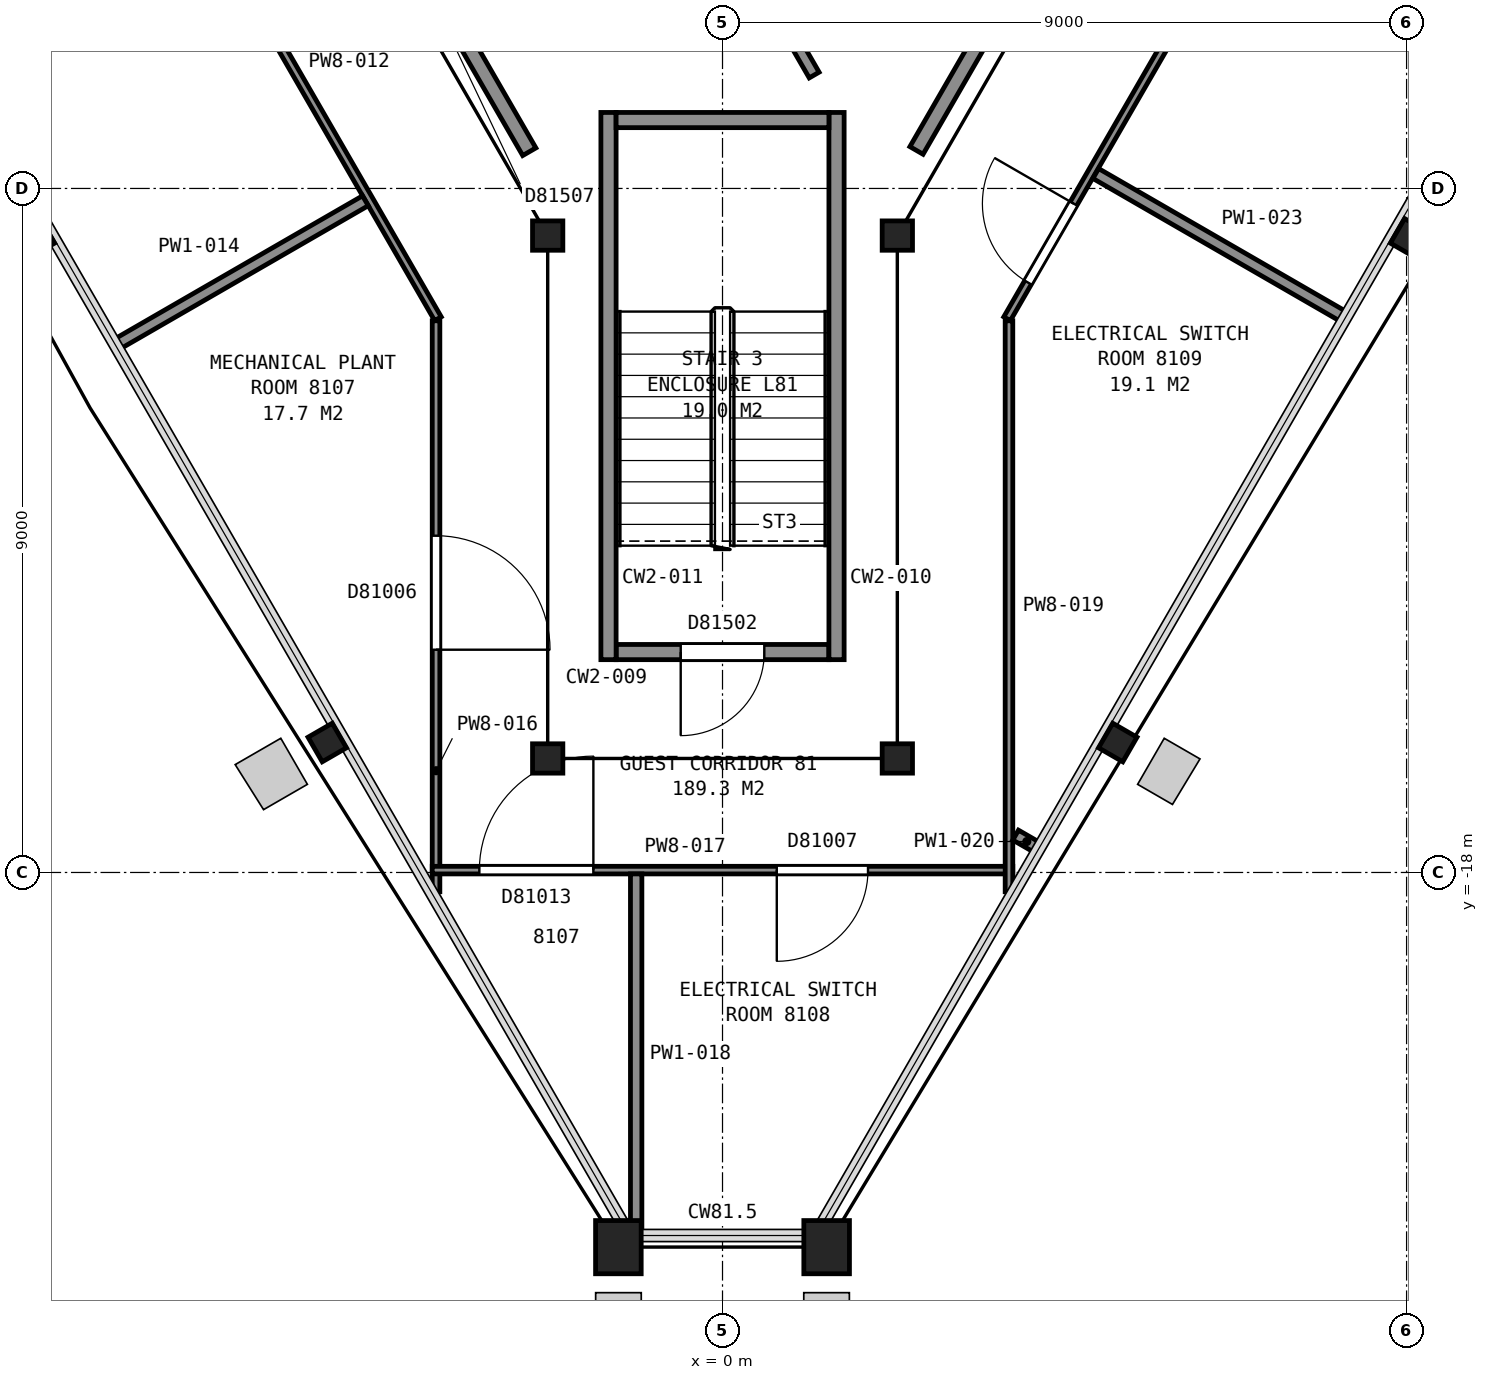
"""IFC4 building model, lengths in metres.
Left out: names, types, materials, properties, quantities, classifications, styles, units other than length and angle.
Written with IfcOpenShell. Run it as: python <this file> out.ifc"""

import sys

from ifc_helpers import new_model, si_unit, direction, frame, frame_2d, origin, origin_2d, place, context, subcontext, project, spatial, rectangle, hollow_rectangle, i_section, extrude, element, fill, save


model = new_model("IFC4")
c1 = context("Model", 3, precision=1e-05, world=origin(), true_north=direction((0.0, 1.0)))
c2 = subcontext(c1, "Body", "Model", "MODEL_VIEW")
j1 = project(units=[si_unit("LENGTHUNIT", "METRE"), si_unit("PLANEANGLEUNIT", "RADIAN")], contexts=[c1])
p1 = place(None, origin())
s1 = spatial("IfcSite", under=j1, at=p1, CompositionType="ELEMENT")
p2 = place(p1, origin())
s2 = spatial("IfcBuilding", under=s1, at=p2, CompositionType="ELEMENT")
p3 = place(p2, frame((0.0, 0.0, 321.0)))
s3 = spatial("IfcBuildingStorey", under=s2, at=p3, CompositionType="ELEMENT", Elevation=321.0)
for number, where, z_axis, x_axis in (
    (1, (-9.04, -9.65, 0.0), (0.0, 0.0, 1.0), (-0.5, 0.866, 0.0)),
    (2, (-5.2, -16.29, 0.0), (0.0, 0.0, 1.0), (-0.5, 0.866, 0.0)),
):
    element("IfcColumn", number, at=place(p3, frame(where, z_axis=z_axis, x_axis=x_axis)), inside=s3, PredefinedType="COLUMN", context=c2, shape_type="SweptSolid", body=[
        extrude(i_section(OverallWidth=0.373, OverallDepth=0.368, WebThickness=0.015, FlangeThickness=0.024, FilletRadius=0.015, at=origin_2d()), origin(), (0.0, 0.0, 1.0), 4.2),
    ])
for number, where, z_axis, x_axis in (
    (3, (-1.37, -22.93, 0.0), (0.0, 0.0, 1.0), (-1.0, 0.0, 0.0)),
    (4, (1.37, -22.93, 0.0), (0.0, 0.0, 1.0), (-1.0, 0.0, 0.0)),
):
    element("IfcColumn", number, at=place(p3, frame(where, z_axis=z_axis, x_axis=x_axis)), inside=s3, PredefinedType="COLUMN", context=c2, shape_type="SweptSolid", body=[
        extrude(hollow_rectangle(XDim=0.6, YDim=0.7, WallThickness=0.04, at=origin_2d()), origin(), (0.0, 0.0, 1.0), 4.2),
    ])
for number, where, z_axis, x_axis in (
    (5, (5.2, -16.29, 0.0), (0.0, 0.0, 1.0), (-0.5, -0.866, 0.0)),
    (6, (9.04, -9.65, 0.0), (0.0, 0.0, 1.0), (-0.5, -0.866, 0.0)),
):
    element("IfcColumn", number, at=place(p3, frame(where, z_axis=z_axis, x_axis=x_axis)), inside=s3, PredefinedType="COLUMN", context=c2, shape_type="SweptSolid", body=[
        extrude(i_section(OverallWidth=0.373, OverallDepth=0.368, WebThickness=0.015, FlangeThickness=0.024, FilletRadius=0.015, at=origin_2d()), origin(), (0.0, 0.0, 1.0), 4.2),
    ])
for number, where, z_axis, x_axis in (
    (7, (-2.3, -9.62, 0.0), (0.0, 0.0, 1.0), (1.0, 0.0, 0.0)),
    (8, (-2.3, -16.5, 0.0), (0.0, 0.0, 1.0), (-1.0, 0.0, 0.0)),
    (9, (2.3, -16.5, 0.0), (0.0, 0.0, 1.0), (-1.0, 0.0, 0.0)),
    (10, (2.3, -9.62, 0.0), (0.0, 0.0, 1.0), (1.0, 0.0, 0.0)),
):
    element("IfcColumn", number, at=place(p3, frame(where, z_axis=z_axis, x_axis=x_axis)), inside=s3, PredefinedType="COLUMN", context=c2, shape_type="SweptSolid", body=[
        extrude(i_section(OverallWidth=0.399, OverallDepth=0.386, WebThickness=0.021, FlangeThickness=0.033, FilletRadius=0.015, at=origin_2d()), origin(), (0.0, 0.0, 1.0), 4.2),
    ])
p4 = place(p3, frame((-1.4, -15.1, 0.0), z_axis=(0.0, 0.0, 1.0), x_axis=(1.0, 0.0, 0.0)))
e11 = element("IfcWall", 11, at=p4, inside=s3, PredefinedType="PARTITIONING", context=c2, shape_type="SweptSolid", body=[
    extrude(rectangle(XDim=2.8, YDim=0.2, at=frame_2d((1.4, 0.0))), origin(), (0.0, 0.0, 1.0), 3.95),
])
p5 = place(p4, frame((0.85, 0.0, 0.0)))
e12 = element("IfcOpeningElement", 12, at=p5, cuts=e11, PredefinedType="OPENING", context=c2, shape_type="SweptSolid", body=[
    extrude(rectangle(XDim=1.1, YDim=2.1, at=frame_2d((0.55, 1.05))), frame((0.0, 0.11, 0.0), z_axis=(0.0, -1.0, 0.0), x_axis=(1.0, 0.0, 0.0)), (0.0, 0.0, 1.0), 0.22),
])
for number, where, z_axis, x_axis in (
    (13, (1.5, -8.0, 0.0), (0.0, 0.0, 1.0), (0.0, -1.0, 0.0)),
    (14, (-1.5, -8.0, 0.0), (0.0, 0.0, 1.0), (0.0, -1.0, 0.0)),
):
    element("IfcWall", number, at=place(p3, frame(where, z_axis=z_axis, x_axis=x_axis)), inside=s3, PredefinedType="PARTITIONING", context=c2, shape_type="SweptSolid", body=[
        extrude(rectangle(XDim=7.2, YDim=0.2, at=frame_2d((3.6, 0.0))), origin(), (0.0, 0.0, 1.0), 3.95),
    ])
p6 = place(p3, frame((-1.4, -8.1, 0.0), z_axis=(0.0, 0.0, 1.0), x_axis=(1.0, 0.0, 0.0)))
e15 = element("IfcWall", 15, at=p6, inside=s3, PredefinedType="PARTITIONING", context=c2, shape_type="SweptSolid", body=[
    extrude(rectangle(XDim=2.8, YDim=0.2, at=frame_2d((1.4, 0.0))), origin(), (0.0, 0.0, 1.0), 3.95),
])
p7 = place(p3, frame((-7.141, -0.551, 0.0), z_axis=(0.0, 0.0, 1.0), x_axis=(0.499992795234, -0.866029563418, 0.0)))
e16 = element("IfcWall", 16, at=p7, inside=s3, PredefinedType="PARTITIONING", context=c2, shape_type="SweptSolid", body=[
    extrude(rectangle(XDim=9.198, YDim=0.2, at=frame_2d((4.599, 0.0))), origin(), (0.0, 0.0, 1.0), 3.95),
])
p8 = place(p7, frame((4.634, 0.0, 0.0)))
e17 = element("IfcOpeningElement", 17, at=p8, cuts=e16, PredefinedType="OPENING", context=c2, shape_type="SweptSolid", body=[
    extrude(rectangle(XDim=1.8, YDim=2.1, at=frame_2d((0.9, 1.05))), frame((0.0, 0.11, 0.0), z_axis=(0.0, -1.0, 0.0), x_axis=(1.0, 0.0, 0.0)), (0.0, 0.0, 1.0), 0.22),
])
p9 = place(p3, frame((-1.007, -3.676, 0.0), z_axis=(0.0, 0.0, 1.0), x_axis=(0.500037662692, -0.866003658127, 0.0)))
e18 = element("IfcWall", 18, at=p9, inside=s3, PredefinedType="PARTITIONING", context=c2, shape_type="SweptSolid", body=[
    extrude(rectangle(XDim=4.425, YDim=0.15, at=frame_2d((2.212, 0.0))), origin(), (0.0, 0.0, 1.0), 3.95),
])
p10 = place(p3, frame((2.552, -8.5, 0.0), z_axis=(0.0, 0.0, 1.0), x_axis=(0.499967462014, 0.866044188784, 0.0)))
e19 = element("IfcWall", 19, at=p10, inside=s3, PredefinedType="PARTITIONING", context=c2, shape_type="SweptSolid", body=[
    extrude(rectangle(XDim=13.025, YDim=0.2, at=frame_2d((6.512, 0.0))), origin(), (0.0, 0.0, 1.0), 3.95),
])
p11 = place(p3, frame((-3.744, -10.714, 0.0), z_axis=(0.0, 0.0, 1.0), x_axis=(-0.500044034969, 0.86599997869, 0.0)))
e20 = element("IfcWall", 20, at=p11, inside=s3, PredefinedType="PARTITIONING", context=c2, shape_type="SweptSolid", body=[
    extrude(rectangle(XDim=15.553, YDim=0.1, at=frame_2d((7.776, 0.0))), origin(), (0.0, 0.0, 1.0), 3.297),
])
p12 = place(p11, frame((7.814, 0.0, 0.0)))
e21 = element("IfcOpeningElement", 21, at=p12, cuts=e20, PredefinedType="OPENING", context=c2, shape_type="SweptSolid", body=[
    extrude(rectangle(XDim=1.5, YDim=2.1, at=frame_2d((0.75, 1.05))), frame((0.0, 0.06, 0.0), z_axis=(0.0, -1.0, 0.0), x_axis=(1.0, 0.0, 0.0)), (0.0, 0.0, 1.0), 0.12),
])
p13 = place(p3, frame((-7.975, -11.054, 0.0), z_axis=(0.0, 0.0, 1.0), x_axis=(0.865998594852, 0.500046431558, 0.0)))
e22 = element("IfcWall", 22, at=p13, inside=s3, PredefinedType="PARTITIONING", context=c2, shape_type="SweptSolid", body=[
    extrude(rectangle(XDim=3.783, YDim=0.15, at=frame_2d((1.892, 0.0))), origin(), (0.0, 0.0, 1.0), 3.297),
])
p14 = place(p3, frame((-3.769, -18.253, 0.0), z_axis=(0.0, 0.0, 1.0), x_axis=(0.0, 1.0, 0.0)))
e23 = element("IfcWall", 23, at=p14, inside=s3, PredefinedType="PARTITIONING", context=c2, shape_type="SweptSolid", body=[
    extrude(rectangle(XDim=7.512, YDim=0.1, at=frame_2d((3.756, 0.0))), origin(), (0.0, 0.0, 1.0), 3.297),
])
p15 = place(p14, frame((3.184, 0.0, 0.0)))
e24 = element("IfcOpeningElement", 24, at=p15, cuts=e23, PredefinedType="OPENING", context=c2, shape_type="SweptSolid", body=[
    extrude(rectangle(XDim=1.5, YDim=2.1, at=frame_2d((0.75, 1.05))), frame((0.0, 0.06, 0.0), z_axis=(0.0, -1.0, 0.0), x_axis=(1.0, 0.0, 0.0)), (0.0, 0.0, 1.0), 0.12),
])
p16 = place(p3, frame((3.819, -17.969, 0.0), z_axis=(0.0, 0.0, 1.0), x_axis=(-1.0, 0.0, 0.0)))
e25 = element("IfcWall", 25, at=p16, inside=s3, PredefinedType="PARTITIONING", context=c2, shape_type="SweptSolid", body=[
    extrude(rectangle(XDim=7.638, YDim=0.1, at=frame_2d((3.819, 0.0))), origin(), (0.0, 0.0, 1.0), 3.297),
])
p17 = place(p16, frame((1.905, 0.0, 0.0)))
e26 = element("IfcOpeningElement", 26, at=p17, cuts=e25, PredefinedType="OPENING", context=c2, shape_type="SweptSolid", body=[
    extrude(rectangle(XDim=1.2, YDim=2.1, at=frame_2d((0.6, 1.05))), frame((0.0, 0.06, 0.0), z_axis=(0.0, -1.0, 0.0), x_axis=(1.0, 0.0, 0.0)), (0.0, 0.0, 1.0), 0.12),
])
p18 = place(p16, frame((5.518, 0.0, 0.0)))
e27 = element("IfcOpeningElement", 27, at=p18, cuts=e25, PredefinedType="OPENING", context=c2, shape_type="SweptSolid", body=[
    extrude(rectangle(XDim=1.5, YDim=2.1, at=frame_2d((0.75, 1.05))), frame((0.0, 0.06, 0.0), z_axis=(0.0, -1.0, 0.0), x_axis=(1.0, 0.0, 0.0)), (0.0, 0.0, 1.0), 0.12),
])
p19 = place(p3, frame((-1.136, -22.764, 0.0), z_axis=(0.0, 0.0, 1.0), x_axis=(0.0, 1.0, 0.0)))
e28 = element("IfcWall", 28, at=p19, inside=s3, PredefinedType="PARTITIONING", context=c2, shape_type="SweptSolid", body=[
    extrude(rectangle(XDim=4.745, YDim=0.15, at=frame_2d((2.373, 0.0))), origin(), (0.0, 0.0, 1.0), 3.297),
])
p20 = place(p3, frame((3.769, -18.253, 0.0), z_axis=(0.0, 0.0, 1.0), x_axis=(0.0, 1.0, 0.0)))
e29 = element("IfcWall", 29, at=p20, inside=s3, PredefinedType="PARTITIONING", context=c2, shape_type="SweptSolid", body=[
    extrude(rectangle(XDim=7.512, YDim=0.1, at=frame_2d((3.756, 0.0))), origin(), (0.0, 0.0, 1.0), 3.297),
])
p21 = place(p3, frame((3.856, -17.508, 0.0), z_axis=(0.0, 0.0, 1.0), x_axis=(0.866377197996, -0.499390178911, 0.0)))
e30 = element("IfcWall", 30, at=p21, inside=s3, PredefinedType="PARTITIONING", context=c2, shape_type="SweptSolid", body=[
    extrude(rectangle(XDim=0.339, YDim=0.15, at=frame_2d((0.17, 0.0))), origin(), (0.0, 0.0, 1.0), 3.297),
])
p22 = place(p3, frame((11.521, 2.754, 0.0), z_axis=(0.0, 0.0, 1.0), x_axis=(-0.500044034969, -0.86599997869, 0.0)))
e31 = element("IfcWall", 31, at=p22, inside=s3, PredefinedType="PARTITIONING", context=c2, shape_type="SweptSolid", body=[
    extrude(rectangle(XDim=15.553, YDim=0.1, at=frame_2d((7.776, 0.0))), origin(), (0.0, 0.0, 1.0), 3.297),
])
p23 = place(p22, frame((13.803, 0.0, 0.0)))
e32 = element("IfcOpeningElement", 32, at=p23, cuts=e31, PredefinedType="OPENING", context=c2, shape_type="SweptSolid", body=[
    extrude(rectangle(XDim=1.2, YDim=2.1, at=frame_2d((0.6, 1.05))), frame((0.0, 0.06, 0.0), z_axis=(0.0, -1.0, 0.0), x_axis=(1.0, 0.0, 0.0)), (0.0, 0.0, 1.0), 0.12),
])
p24 = place(p22, frame((8.665, 0.0, 0.0)))
e33 = element("IfcOpeningElement", 33, at=p24, cuts=e31, PredefinedType="OPENING", context=c2, shape_type="SweptSolid", body=[
    extrude(rectangle(XDim=1.2, YDim=2.1, at=frame_2d((0.6, 1.05))), frame((0.0, 0.06, 0.0), z_axis=(0.0, -1.0, 0.0), x_axis=(1.0, 0.0, 0.0)), (0.0, 0.0, 1.0), 0.12),
])
p25 = place(p22, frame((2.049, 0.0, 0.0)))
e34 = element("IfcOpeningElement", 34, at=p25, cuts=e31, PredefinedType="OPENING", context=c2, shape_type="SweptSolid", body=[
    extrude(rectangle(XDim=1.2, YDim=2.1, at=frame_2d((0.6, 1.05))), frame((0.0, 0.06, 0.0), z_axis=(0.0, -1.0, 0.0), x_axis=(1.0, 0.0, 0.0)), (0.0, 0.0, 1.0), 0.12),
])
p26 = place(p3, frame((4.911, -8.803, 0.0), z_axis=(0.0, 0.0, 1.0), x_axis=(0.865975758382, -0.500085978503, 0.0)))
e35 = element("IfcWall", 35, at=p26, inside=s3, PredefinedType="PARTITIONING", context=c2, shape_type="SweptSolid", body=[
    extrude(rectangle(XDim=3.779, YDim=0.15, at=frame_2d((1.889, 0.0))), origin(), (0.0, 0.0, 1.0), 3.297),
])
p27 = place(p5, origin())
e36 = element("IfcDoor", 36, at=p27, inside=s3, OperationType="SINGLE_SWING_LEFT", PredefinedType="DOOR", context=c2, shape_type="SweptSolid", body=[
    extrude(rectangle(XDim=1.1, YDim=2.1, at=frame_2d((0.55, 1.05))), frame((0.0, 0.025, 0.0), z_axis=(0.0, -1.0, 0.0), x_axis=(1.0, 0.0, 0.0)), (0.0, 0.0, 1.0), 0.05),
])
fill(e12, e36)
p28 = place(p15, origin())
e37 = element("IfcDoor", 37, at=p28, inside=s3, OperationType="DOUBLE_DOOR_SINGLE_SWING", PredefinedType="DOOR", context=c2, shape_type="SweptSolid", body=[
    extrude(rectangle(XDim=1.5, YDim=2.1, at=frame_2d((0.75, 1.05))), frame((0.0, 0.025, 0.0), z_axis=(0.0, -1.0, 0.0), x_axis=(1.0, 0.0, 0.0)), (0.0, 0.0, 1.0), 0.05),
])
fill(e24, e37)
p29 = place(p17, origin())
e38 = element("IfcDoor", 38, at=p29, inside=s3, OperationType="SINGLE_SWING_RIGHT", PredefinedType="DOOR", context=c2, shape_type="SweptSolid", body=[
    extrude(rectangle(XDim=1.2, YDim=2.1, at=frame_2d((0.6, 1.05))), frame((0.0, 0.025, 0.0), z_axis=(0.0, -1.0, 0.0), x_axis=(1.0, 0.0, 0.0)), (0.0, 0.0, 1.0), 0.05),
])
fill(e26, e38)
p30 = place(p18, origin())
e39 = element("IfcDoor", 39, at=p30, inside=s3, OperationType="DOUBLE_DOOR_SINGLE_SWING", PredefinedType="DOOR", context=c2, shape_type="SweptSolid", body=[
    extrude(rectangle(XDim=1.5, YDim=2.1, at=frame_2d((0.75, 1.05))), frame((0.0, 0.025, 0.0), z_axis=(0.0, -1.0, 0.0), x_axis=(1.0, 0.0, 0.0)), (0.0, 0.0, 1.0), 0.05),
])
fill(e27, e39)
p31 = place(p23, origin())
e40 = element("IfcDoor", 40, at=p31, inside=s3, OperationType="SINGLE_SWING_LEFT", PredefinedType="DOOR", context=c2, shape_type="SweptSolid", body=[
    extrude(rectangle(XDim=1.2, YDim=2.1, at=frame_2d((0.6, 1.05))), frame((0.0, 0.025, 0.0), z_axis=(0.0, -1.0, 0.0), x_axis=(1.0, 0.0, 0.0)), (0.0, 0.0, 1.0), 0.05),
])
fill(e32, e40)
save(model, sys.argv[1])
